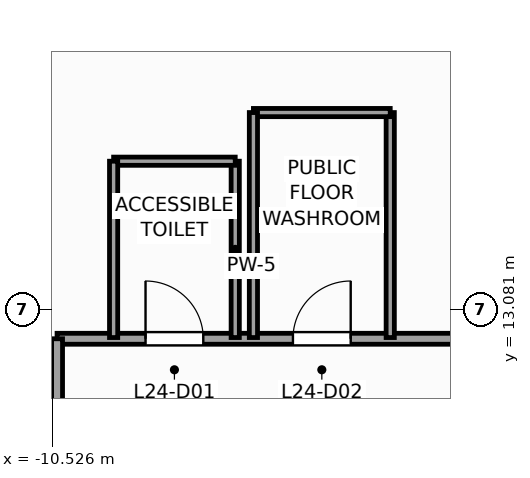
"""IFC4 building model, lengths in metres.
Left out: names, types, materials, properties, quantities, classifications, styles, units other than length and angle.
Written with IfcOpenShell. Run it as: python <this file> out.ifc"""

import sys

from ifc_helpers import new_model, si_unit, direction, frame, frame_2d, origin, place, context, subcontext, project, spatial, rectangle, extrude, source, transform, mapped, element, fill, save


model = new_model("IFC4")
c1 = context("Model", 3, precision=1e-05, world=origin(), true_north=direction((0.0, 1.0)))
c2 = subcontext(c1, "Body", "Model", "MODEL_VIEW")
j1 = project(units=[si_unit("LENGTHUNIT", "METRE"), si_unit("PLANEANGLEUNIT", "RADIAN")], contexts=[c1])
p1 = place(None, origin())
s1 = spatial("IfcSite", under=j1, at=p1, CompositionType="ELEMENT")
p2 = place(p1, origin())
s2 = spatial("IfcBuilding", under=s1, at=p2, CompositionType="ELEMENT")
p3 = place(p2, frame((0.0, 0.0, 103.2)))
s3 = spatial("IfcBuildingStorey", under=s2, at=p3, CompositionType="ELEMENT", Elevation=103.2)
p4 = place(p3, frame((-10.45, 12.6, 0.0), z_axis=(0.0, 0.0, 1.0), x_axis=(1.0, 0.0, 0.0)))
e1 = element("IfcWall", 1, at=p4, inside=s3, PredefinedType="PARTITIONING", context=c2, shape_type="SweptSolid", body=[
    extrude(rectangle(XDim=23.05, YDim=0.18, at=frame_2d((11.525, 0.0))), origin(), (0.0, 0.0, 1.0), 3.74),
])
p5 = place(p4, frame((1.455, 0.0, 0.0)))
e2 = element("IfcOpeningElement", 2, at=p5, cuts=e1, PredefinedType="OPENING", context=c2, shape_type="SweptSolid", body=[
    extrude(rectangle(XDim=0.95, YDim=2.1, at=frame_2d((0.475, 1.05))), frame((0.0, 0.1, 0.0), z_axis=(0.0, -1.0, 0.0), x_axis=(1.0, 0.0, 0.0)), (0.0, 0.0, 1.0), 0.2),
])
p6 = place(p4, frame((3.879, 0.0, 0.0)))
e3 = element("IfcOpeningElement", 3, at=p6, cuts=e1, PredefinedType="OPENING", context=c2, shape_type="SweptSolid", body=[
    extrude(rectangle(XDim=0.95, YDim=2.1, at=frame_2d((0.475, 1.05))), frame((0.0, 0.1, 0.0), z_axis=(0.0, -1.0, 0.0), x_axis=(1.0, 0.0, 0.0)), (0.0, 0.0, 1.0), 0.2),
])
p7 = place(p4, frame((14.436, 0.0, 0.0)))
e4 = element("IfcOpeningElement", 4, at=p7, cuts=e1, PredefinedType="OPENING", context=c2, shape_type="SweptSolid", body=[
    extrude(rectangle(XDim=1.1, YDim=2.2, at=frame_2d((0.55, 1.1))), frame((0.0, 0.1, 0.0), z_axis=(0.0, -1.0, 0.0), x_axis=(1.0, 0.0, 0.0)), (0.0, 0.0, 1.0), 0.2),
])
p8 = place(p3, frame((-10.45, -1.05, 0.0), z_axis=(0.0, 0.0, 1.0), x_axis=(0.0, 1.0, 0.0)))
e5 = element("IfcWall", 5, at=p8, inside=s3, PredefinedType="PARTITIONING", context=c2, shape_type="SweptSolid", body=[
    extrude(rectangle(XDim=13.65, YDim=0.18, at=frame_2d((6.825, 0.0))), origin(), (0.0, 0.0, 1.0), 3.74),
])
p9 = place(p3, frame((-7.52, 12.62, 0.0), z_axis=(0.0, 0.0, 1.0), x_axis=(0.0, 1.0, 0.0)))
e6 = element("IfcWall", 6, at=p9, inside=s3, PredefinedType="PARTITIONING", context=c2, shape_type="SweptSolid", body=[
    extrude(rectangle(XDim=2.9, YDim=0.135, at=frame_2d((1.45, 0.0))), origin(), (0.0, 0.0, 1.0), 3.74),
])
p10 = place(p3, frame((-9.52, 15.52, 0.0), z_axis=(0.0, 0.0, 1.0), x_axis=(1.0, 0.0, 0.0)))
e7 = element("IfcWall", 7, at=p10, inside=s3, PredefinedType="PARTITIONING", context=c2, shape_type="SweptSolid", body=[
    extrude(rectangle(XDim=2.0, YDim=0.135, at=frame_2d((1.0, 0.0))), origin(), (0.0, 0.0, 1.0), 3.74),
])
p11 = place(p3, frame((-9.52, 12.62, 0.0), z_axis=(0.0, 0.0, 1.0), x_axis=(0.0, 1.0, 0.0)))
e8 = element("IfcWall", 8, at=p11, inside=s3, PredefinedType="PARTITIONING", context=c2, shape_type="SweptSolid", body=[
    extrude(rectangle(XDim=2.9, YDim=0.135, at=frame_2d((1.45, 0.0))), origin(), (0.0, 0.0, 1.0), 3.74),
])
p12 = place(p3, frame((-4.971, 12.62, 0.0), z_axis=(0.0, 0.0, 1.0), x_axis=(0.0, 1.0, 0.0)))
e9 = element("IfcWall", 9, at=p12, inside=s3, PredefinedType="PARTITIONING", context=c2, shape_type="SweptSolid", body=[
    extrude(rectangle(XDim=3.7, YDim=0.135, at=frame_2d((1.85, 0.0))), origin(), (0.0, 0.0, 1.0), 3.74),
])
p13 = place(p3, frame((-7.221, 16.32, 0.0), z_axis=(0.0, 0.0, 1.0), x_axis=(1.0, 0.0, 0.0)))
e10 = element("IfcWall", 10, at=p13, inside=s3, PredefinedType="PARTITIONING", context=c2, shape_type="SweptSolid", body=[
    extrude(rectangle(XDim=2.25, YDim=0.135, at=frame_2d((1.125, 0.0))), origin(), (0.0, 0.0, 1.0), 3.74),
])
p14 = place(p3, frame((-7.221, 12.62, 0.0), z_axis=(0.0, 0.0, 1.0), x_axis=(0.0, 1.0, 0.0)))
e11 = element("IfcWall", 11, at=p14, inside=s3, PredefinedType="PARTITIONING", context=c2, shape_type="SweptSolid", body=[
    extrude(rectangle(XDim=3.7, YDim=0.135, at=frame_2d((1.85, 0.0))), origin(), (0.0, 0.0, 1.0), 3.74),
])
m1 = source(origin(), c2, "Body", "SweptSolid", [
    extrude(rectangle(XDim=0.95, YDim=2.1, at=frame_2d((0.475, 1.05))), frame((0.0, 0.025, 0.0), z_axis=(0.0, -1.0, 0.0), x_axis=(1.0, 0.0, 0.0)), (0.0, 0.0, 1.0), 0.05),
])
p15 = place(p5, origin())
e12 = element("IfcDoor", 12, at=p15, inside=s3, OperationType="SINGLE_SWING_LEFT", PredefinedType="DOOR", context=c2, shape_type="MappedRepresentation", body=[
    mapped(m1, transform((0.0, 0.0, 0.0), scale=1.0)),
])
fill(e2, e12)
p16 = place(p6, origin())
e13 = element("IfcDoor", 13, at=p16, inside=s3, OperationType="SINGLE_SWING_RIGHT", PredefinedType="DOOR", context=c2, shape_type="MappedRepresentation", body=[
    mapped(m1, transform((0.0, 0.0, 0.0), scale=1.0)),
])
fill(e3, e13)
save(model, sys.argv[1])
